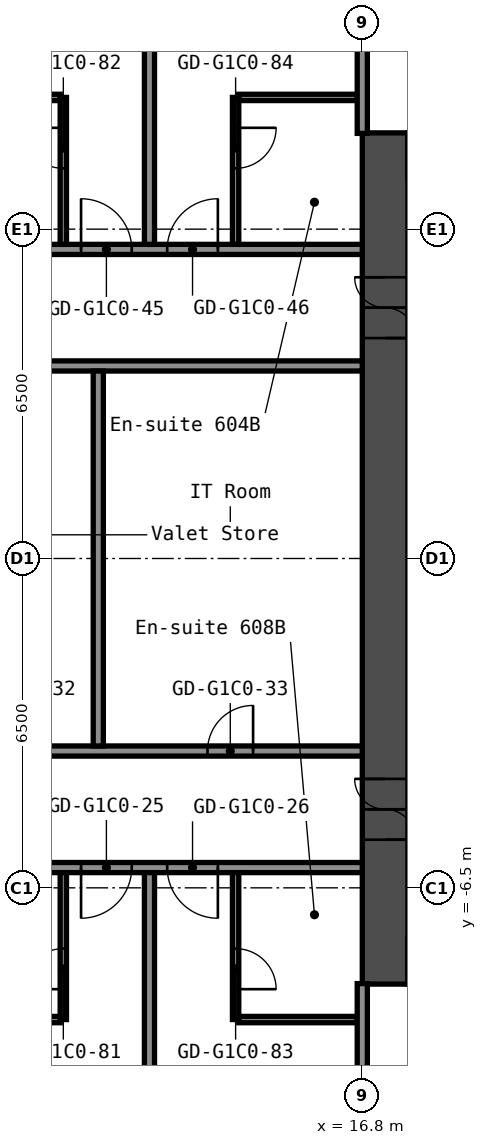
"""IFC4 building model, lengths in metres.
Left out: names, types, materials, properties, quantities, classifications, styles, units other than length and angle.
Written with IfcOpenShell. Run it as: python <this file> out.ifc"""

import sys

from ifc_helpers import new_model, si_unit, direction, frame, frame_2d, origin, place, context, subcontext, project, spatial, rectangle, extrude, element, fill, save


model = new_model("IFC4")
c1 = context("Model", 3, precision=1e-05, world=origin(), true_north=direction((0.0, 1.0)))
c2 = subcontext(c1, "Body", "Model", "MODEL_VIEW")
j1 = project(units=[si_unit("LENGTHUNIT", "METRE"), si_unit("PLANEANGLEUNIT", "RADIAN")], contexts=[c1])
p1 = place(None, origin())
s1 = spatial("IfcSite", under=j1, at=p1, CompositionType="ELEMENT")
p2 = place(p1, origin())
s2 = spatial("IfcBuilding", under=s1, at=p2, CompositionType="ELEMENT")
p3 = place(p2, frame((0.0, 0.0, 26.2)))
s3 = spatial("IfcBuildingStorey", under=s2, at=p3, CompositionType="ELEMENT", Elevation=26.2)
p4 = place(p3, frame((17.25, -8.4, 0.0), z_axis=(0.0, 0.0, 1.0), x_axis=(0.0, 1.0, 0.0)))
e1 = element("IfcWall", 1, at=p4, inside=s3, PredefinedType="SHEAR", context=c2, shape_type="SweptSolid", body=[
    extrude(rectangle(XDim=16.8, YDim=0.9, at=frame_2d((8.4, 0.0))), origin(), (0.0, 0.0, 1.0), 2.8),
])
p5 = place(p4, frame((12.75, 0.0, 0.0)))
e2 = element("IfcOpeningElement", 2, at=p5, cuts=e1, PredefinedType="OPENING", context=c2, shape_type="SweptSolid", body=[
    extrude(rectangle(XDim=1.2, YDim=2.1, at=frame_2d((0.6, 1.05))), frame((0.0, 0.46, 0.0), z_axis=(0.0, -1.0, 0.0), x_axis=(1.0, 0.0, 0.0)), (0.0, 0.0, 1.0), 0.92),
])
p6 = place(p4, frame((2.85, 0.0, 0.0)))
e3 = element("IfcOpeningElement", 3, at=p6, cuts=e1, PredefinedType="OPENING", context=c2, shape_type="SweptSolid", body=[
    extrude(rectangle(XDim=1.2, YDim=2.1, at=frame_2d((0.6, 1.05))), frame((0.0, 0.46, 0.0), z_axis=(0.0, -1.0, 0.0), x_axis=(1.0, 0.0, 0.0)), (0.0, 0.0, 1.0), 0.92),
])
p7 = place(p3, frame((17.7, 7.95, 0.0), z_axis=(0.0, 0.0, 1.0), x_axis=(1.0, 0.0, 0.0)))
e4 = element("IfcWall", 4, at=p7, inside=s3, PredefinedType="SHEAR", context=c2, shape_type="SweptSolid", body=[
    extrude(rectangle(XDim=15.0, YDim=0.9, at=frame_2d((7.5, 0.0))), origin(), (0.0, 0.0, 1.0), 2.8),
])
p8 = place(p7, frame((10.4, 0.0, 0.0)))
e5 = element("IfcOpeningElement", 5, at=p8, cuts=e4, PredefinedType="OPENING", context=c2, shape_type="SweptSolid", body=[
    extrude(rectangle(XDim=1.2, YDim=2.1, at=frame_2d((0.6, 1.05))), frame((0.0, 0.46, 0.0), z_axis=(0.0, -1.0, 0.0), x_axis=(1.0, 0.0, 0.0)), (0.0, 0.0, 1.0), 0.92),
])
p9 = place(p7, frame((13.35, 0.0, 0.0)))
e6 = element("IfcOpeningElement", 6, at=p9, cuts=e4, PredefinedType="OPENING", context=c2, shape_type="SweptSolid", body=[
    extrude(rectangle(XDim=0.9, YDim=2.1, at=frame_2d((0.45, 1.05))), frame((0.0, 0.46, 0.0), z_axis=(0.0, -1.0, 0.0), x_axis=(1.0, 0.0, 0.0)), (0.0, 0.0, 1.0), 0.92),
])
p10 = place(p3, frame((17.7, -7.95, 0.0), z_axis=(0.0, 0.0, 1.0), x_axis=(1.0, 0.0, 0.0)))
e7 = element("IfcWall", 7, at=p10, inside=s3, PredefinedType="SHEAR", context=c2, shape_type="SweptSolid", body=[
    extrude(rectangle(XDim=15.0, YDim=0.9, at=frame_2d((7.5, 0.0))), origin(), (0.0, 0.0, 1.0), 2.8),
])
p11 = place(p10, frame((2.55, 0.0, 0.0)))
e8 = element("IfcOpeningElement", 8, at=p11, cuts=e7, PredefinedType="OPENING", context=c2, shape_type="SweptSolid", body=[
    extrude(rectangle(XDim=1.0, YDim=2.1, at=frame_2d((0.5, 1.05))), frame((0.0, 0.46, 0.0), z_axis=(0.0, -1.0, 0.0), x_axis=(1.0, 0.0, 0.0)), (0.0, 0.0, 1.0), 0.92),
])
for number, where, z_axis, x_axis in (
    (9, (8.5, -9.1, 0.0), (0.0, 0.0, 1.0), (1.0, 0.0, 0.0)),
    (10, (14.363, -9.1, 0.0), (0.0, 0.0, 1.0), (1.0, 0.0, 0.0)),
):
    element("IfcWall", number, at=place(p3, frame(where, z_axis=z_axis, x_axis=x_axis)), inside=s3, PredefinedType="PARTITIONING", context=c2, shape_type="SweptSolid", body=[
        extrude(rectangle(XDim=2.337, YDim=0.125, at=frame_2d((1.169, 0.0))), origin(), (0.0, 0.0, 1.0), 2.8),
    ])
p12 = place(p3, frame((-16.8, -6.1, 0.0), z_axis=(0.0, 0.0, 1.0), x_axis=(1.0, 0.0, 0.0)))
e11 = element("IfcWall", 11, at=p12, inside=s3, PredefinedType="PARTITIONING", context=c2, shape_type="SweptSolid", body=[
    extrude(rectangle(XDim=33.6, YDim=0.2, at=frame_2d((16.8, 0.0))), origin(), (0.0, 0.0, 1.0), 2.8),
])
p13 = place(p12, frame((2.0, 0.0, 0.0)))
e12 = element("IfcOpeningElement", 12, at=p13, cuts=e11, PredefinedType="OPENING", context=c2, shape_type="SweptSolid", body=[
    extrude(rectangle(XDim=1.0, YDim=2.1, at=frame_2d((0.5, 1.05))), frame((0.0, 0.11, 0.0), z_axis=(0.0, -1.0, 0.0), x_axis=(1.0, 0.0, 0.0)), (0.0, 0.0, 1.0), 0.22),
])
p14 = place(p12, frame((11.25, 0.0, 0.0)))
e13 = element("IfcOpeningElement", 13, at=p14, cuts=e11, PredefinedType="OPENING", context=c2, shape_type="SweptSolid", body=[
    extrude(rectangle(XDim=1.0, YDim=2.1, at=frame_2d((0.5, 1.05))), frame((0.0, 0.11, 0.0), z_axis=(0.0, -1.0, 0.0), x_axis=(1.0, 0.0, 0.0)), (0.0, 0.0, 1.0), 0.22),
])
p15 = place(p12, frame((12.95, 0.0, 0.0)))
e14 = element("IfcOpeningElement", 14, at=p15, cuts=e11, PredefinedType="OPENING", context=c2, shape_type="SweptSolid", body=[
    extrude(rectangle(XDim=1.0, YDim=2.1, at=frame_2d((0.5, 1.05))), frame((0.0, 0.11, 0.0), z_axis=(0.0, -1.0, 0.0), x_axis=(1.0, 0.0, 0.0)), (0.0, 0.0, 1.0), 0.22),
])
p16 = place(p12, frame((18.28, 0.0, 0.0)))
e15 = element("IfcOpeningElement", 15, at=p16, cuts=e11, PredefinedType="OPENING", context=c2, shape_type="SweptSolid", body=[
    extrude(rectangle(XDim=0.9, YDim=2.1, at=frame_2d((0.45, 1.05))), frame((0.0, 0.11, 0.0), z_axis=(0.0, -1.0, 0.0), x_axis=(1.0, 0.0, 0.0)), (0.0, 0.0, 1.0), 0.22),
])
p17 = place(p12, frame((22.48, 0.0, 0.0)))
e16 = element("IfcOpeningElement", 16, at=p17, cuts=e11, PredefinedType="OPENING", context=c2, shape_type="SweptSolid", body=[
    extrude(rectangle(XDim=0.9, YDim=2.1, at=frame_2d((0.45, 1.05))), frame((0.0, 0.11, 0.0), z_axis=(0.0, -1.0, 0.0), x_axis=(1.0, 0.0, 0.0)), (0.0, 0.0, 1.0), 0.22),
])
p18 = place(p12, frame((28.05, 0.0, 0.0)))
e17 = element("IfcOpeningElement", 17, at=p18, cuts=e11, PredefinedType="OPENING", context=c2, shape_type="SweptSolid", body=[
    extrude(rectangle(XDim=1.0, YDim=2.1, at=frame_2d((0.5, 1.05))), frame((0.0, 0.11, 0.0), z_axis=(0.0, -1.0, 0.0), x_axis=(1.0, 0.0, 0.0)), (0.0, 0.0, 1.0), 0.22),
])
p19 = place(p12, frame((29.75, 0.0, 0.0)))
e18 = element("IfcOpeningElement", 18, at=p19, cuts=e11, PredefinedType="OPENING", context=c2, shape_type="SweptSolid", body=[
    extrude(rectangle(XDim=1.0, YDim=2.1, at=frame_2d((0.5, 1.05))), frame((0.0, 0.11, 0.0), z_axis=(0.0, -1.0, 0.0), x_axis=(1.0, 0.0, 0.0)), (0.0, 0.0, 1.0), 0.22),
])
p20 = place(p3, frame((-16.8, -3.8, 0.0), z_axis=(0.0, 0.0, 1.0), x_axis=(1.0, 0.0, 0.0)))
e19 = element("IfcWall", 19, at=p20, inside=s3, PredefinedType="PARTITIONING", context=c2, shape_type="SweptSolid", body=[
    extrude(rectangle(XDim=33.6, YDim=0.2, at=frame_2d((16.8, 0.0))), origin(), (0.0, 0.0, 1.0), 2.8),
])
p21 = place(p20, frame((9.715, 0.0, 0.0)))
e20 = element("IfcOpeningElement", 20, at=p21, cuts=e19, PredefinedType="OPENING", context=c2, shape_type="SweptSolid", body=[
    extrude(rectangle(XDim=0.9, YDim=2.1, at=frame_2d((0.45, 1.05))), frame((0.0, 0.11, 0.0), z_axis=(0.0, -1.0, 0.0), x_axis=(1.0, 0.0, 0.0)), (0.0, 0.0, 1.0), 0.22),
])
p22 = place(p20, frame((13.915, 0.0, 0.0)))
e21 = element("IfcOpeningElement", 21, at=p22, cuts=e19, PredefinedType="OPENING", context=c2, shape_type="SweptSolid", body=[
    extrude(rectangle(XDim=0.9, YDim=2.1, at=frame_2d((0.45, 1.05))), frame((0.0, 0.11, 0.0), z_axis=(0.0, -1.0, 0.0), x_axis=(1.0, 0.0, 0.0)), (0.0, 0.0, 1.0), 0.22),
])
p23 = place(p20, frame((26.345, 0.0, 0.0)))
e22 = element("IfcOpeningElement", 22, at=p23, cuts=e19, PredefinedType="OPENING", context=c2, shape_type="SweptSolid", body=[
    extrude(rectangle(XDim=0.9, YDim=2.1, at=frame_2d((0.45, 1.05))), frame((0.0, 0.11, 0.0), z_axis=(0.0, -1.0, 0.0), x_axis=(1.0, 0.0, 0.0)), (0.0, 0.0, 1.0), 0.22),
])
p24 = place(p20, frame((30.545, 0.0, 0.0)))
e23 = element("IfcOpeningElement", 23, at=p24, cuts=e19, PredefinedType="OPENING", context=c2, shape_type="SweptSolid", body=[
    extrude(rectangle(XDim=0.9, YDim=2.1, at=frame_2d((0.45, 1.05))), frame((0.0, 0.11, 0.0), z_axis=(0.0, -1.0, 0.0), x_axis=(1.0, 0.0, 0.0)), (0.0, 0.0, 1.0), 0.22),
])
p25 = place(p3, frame((-16.8, 3.8, 0.0), z_axis=(0.0, 0.0, 1.0), x_axis=(1.0, 0.0, 0.0)))
e24 = element("IfcWall", 24, at=p25, inside=s3, PredefinedType="PARTITIONING", context=c2, shape_type="SweptSolid", body=[
    extrude(rectangle(XDim=33.6, YDim=0.2, at=frame_2d((16.8, 0.0))), origin(), (0.0, 0.0, 1.0), 2.8),
])
p26 = place(p25, frame((1.985, 0.0, 0.0)))
e25 = element("IfcOpeningElement", 25, at=p26, cuts=e24, PredefinedType="OPENING", context=c2, shape_type="SweptSolid", body=[
    extrude(rectangle(XDim=0.9, YDim=2.1, at=frame_2d((0.45, 1.05))), frame((0.0, 0.11, 0.0), z_axis=(0.0, -1.0, 0.0), x_axis=(1.0, 0.0, 0.0)), (0.0, 0.0, 1.0), 0.22),
])
p27 = place(p25, frame((6.185, 0.0, 0.0)))
e26 = element("IfcOpeningElement", 26, at=p27, cuts=e24, PredefinedType="OPENING", context=c2, shape_type="SweptSolid", body=[
    extrude(rectangle(XDim=0.9, YDim=2.1, at=frame_2d((0.45, 1.05))), frame((0.0, 0.11, 0.0), z_axis=(0.0, -1.0, 0.0), x_axis=(1.0, 0.0, 0.0)), (0.0, 0.0, 1.0), 0.22),
])
p28 = place(p25, frame((18.2, 0.0, 0.0)))
e27 = element("IfcOpeningElement", 27, at=p28, cuts=e24, PredefinedType="OPENING", context=c2, shape_type="SweptSolid", body=[
    extrude(rectangle(XDim=0.9, YDim=2.1, at=frame_2d((0.45, 1.05))), frame((0.0, 0.11, 0.0), z_axis=(0.0, -1.0, 0.0), x_axis=(1.0, 0.0, 0.0)), (0.0, 0.0, 1.0), 0.22),
])
p29 = place(p25, frame((22.4, 0.0, 0.0)))
e28 = element("IfcOpeningElement", 28, at=p29, cuts=e24, PredefinedType="OPENING", context=c2, shape_type="SweptSolid", body=[
    extrude(rectangle(XDim=0.9, YDim=2.1, at=frame_2d((0.45, 1.05))), frame((0.0, 0.11, 0.0), z_axis=(0.0, -1.0, 0.0), x_axis=(1.0, 0.0, 0.0)), (0.0, 0.0, 1.0), 0.22),
])
p30 = place(p3, frame((-16.8, 6.1, 0.0), z_axis=(0.0, 0.0, 1.0), x_axis=(1.0, 0.0, 0.0)))
e29 = element("IfcWall", 29, at=p30, inside=s3, PredefinedType="PARTITIONING", context=c2, shape_type="SweptSolid", body=[
    extrude(rectangle(XDim=33.6, YDim=0.2, at=frame_2d((16.8, 0.0))), origin(), (0.0, 0.0, 1.0), 2.8),
])
p31 = place(p30, frame((2.0, 0.0, 0.0)))
e30 = element("IfcOpeningElement", 30, at=p31, cuts=e29, PredefinedType="OPENING", context=c2, shape_type="SweptSolid", body=[
    extrude(rectangle(XDim=1.0, YDim=2.1, at=frame_2d((0.5, 1.05))), frame((0.0, 0.11, 0.0), z_axis=(0.0, -1.0, 0.0), x_axis=(1.0, 0.0, 0.0)), (0.0, 0.0, 1.0), 0.22),
])
p32 = place(p30, frame((11.25, 0.0, 0.0)))
e31 = element("IfcOpeningElement", 31, at=p32, cuts=e29, PredefinedType="OPENING", context=c2, shape_type="SweptSolid", body=[
    extrude(rectangle(XDim=1.0, YDim=2.1, at=frame_2d((0.5, 1.05))), frame((0.0, 0.11, 0.0), z_axis=(0.0, -1.0, 0.0), x_axis=(1.0, 0.0, 0.0)), (0.0, 0.0, 1.0), 0.22),
])
p33 = place(p30, frame((12.95, 0.0, 0.0)))
e32 = element("IfcOpeningElement", 32, at=p33, cuts=e29, PredefinedType="OPENING", context=c2, shape_type="SweptSolid", body=[
    extrude(rectangle(XDim=1.0, YDim=2.1, at=frame_2d((0.5, 1.05))), frame((0.0, 0.11, 0.0), z_axis=(0.0, -1.0, 0.0), x_axis=(1.0, 0.0, 0.0)), (0.0, 0.0, 1.0), 0.22),
])
p34 = place(p30, frame((18.7, 0.0, 0.0)))
e33 = element("IfcOpeningElement", 33, at=p34, cuts=e29, PredefinedType="OPENING", context=c2, shape_type="SweptSolid", body=[
    extrude(rectangle(XDim=0.9, YDim=2.1, at=frame_2d((0.45, 1.05))), frame((0.0, 0.11, 0.0), z_axis=(0.0, -1.0, 0.0), x_axis=(1.0, 0.0, 0.0)), (0.0, 0.0, 1.0), 0.22),
])
p35 = place(p30, frame((22.9, 0.0, 0.0)))
e34 = element("IfcOpeningElement", 34, at=p35, cuts=e29, PredefinedType="OPENING", context=c2, shape_type="SweptSolid", body=[
    extrude(rectangle(XDim=0.9, YDim=2.1, at=frame_2d((0.45, 1.05))), frame((0.0, 0.11, 0.0), z_axis=(0.0, -1.0, 0.0), x_axis=(1.0, 0.0, 0.0)), (0.0, 0.0, 1.0), 0.22),
])
p36 = place(p30, frame((28.05, 0.0, 0.0)))
e35 = element("IfcOpeningElement", 35, at=p36, cuts=e29, PredefinedType="OPENING", context=c2, shape_type="SweptSolid", body=[
    extrude(rectangle(XDim=1.0, YDim=2.1, at=frame_2d((0.5, 1.05))), frame((0.0, 0.11, 0.0), z_axis=(0.0, -1.0, 0.0), x_axis=(1.0, 0.0, 0.0)), (0.0, 0.0, 1.0), 0.22),
])
p37 = place(p30, frame((29.75, 0.0, 0.0)))
e36 = element("IfcOpeningElement", 36, at=p37, cuts=e29, PredefinedType="OPENING", context=c2, shape_type="SweptSolid", body=[
    extrude(rectangle(XDim=1.0, YDim=2.1, at=frame_2d((0.5, 1.05))), frame((0.0, 0.11, 0.0), z_axis=(0.0, -1.0, 0.0), x_axis=(1.0, 0.0, 0.0)), (0.0, 0.0, 1.0), 0.22),
])
for number, where, z_axis, x_axis in (
    (37, (8.5, 9.1, 0.0), (0.0, 0.0, 1.0), (1.0, 0.0, 0.0)),
    (38, (14.363, 9.1, 0.0), (0.0, 0.0, 1.0), (1.0, 0.0, 0.0)),
):
    element("IfcWall", number, at=place(p3, frame(where, z_axis=z_axis, x_axis=x_axis)), inside=s3, PredefinedType="PARTITIONING", context=c2, shape_type="SweptSolid", body=[
        extrude(rectangle(XDim=2.337, YDim=0.125, at=frame_2d((1.169, 0.0))), origin(), (0.0, 0.0, 1.0), 2.8),
    ])
p38 = place(p3, frame((10.9, -9.1, 0.0), z_axis=(0.0, 0.0, 1.0), x_axis=(0.0, 1.0, 0.0)))
e39 = element("IfcWall", 39, at=p38, inside=s3, PredefinedType="PARTITIONING", context=c2, shape_type="SweptSolid", body=[
    extrude(rectangle(XDim=2.9, YDim=0.125, at=frame_2d((1.45, 0.0))), origin(), (0.0, 0.0, 1.0), 2.8),
])
p39 = place(p38, frame((0.6, 0.0, 0.0)))
e40 = element("IfcOpeningElement", 40, at=p39, cuts=e39, PredefinedType="OPENING", context=c2, shape_type="SweptSolid", body=[
    extrude(rectangle(XDim=0.8, YDim=2.1, at=frame_2d((0.4, 1.05))), frame((0.0, 0.073, 0.0), z_axis=(0.0, -1.0, 0.0), x_axis=(1.0, 0.0, 0.0)), (0.0, 0.0, 1.0), 0.145),
])
p40 = place(p3, frame((10.9, 6.2, 0.0), z_axis=(0.0, 0.0, 1.0), x_axis=(0.0, 1.0, 0.0)))
e41 = element("IfcWall", 41, at=p40, inside=s3, PredefinedType="PARTITIONING", context=c2, shape_type="SweptSolid", body=[
    extrude(rectangle(XDim=2.9, YDim=0.125, at=frame_2d((1.45, 0.0))), origin(), (0.0, 0.0, 1.0), 2.8),
])
p41 = place(p40, frame((1.5, 0.0, 0.0)))
e42 = element("IfcOpeningElement", 42, at=p41, cuts=e41, PredefinedType="OPENING", context=c2, shape_type="SweptSolid", body=[
    extrude(rectangle(XDim=0.8, YDim=2.1, at=frame_2d((0.4, 1.05))), frame((0.0, 0.073, 0.0), z_axis=(0.0, -1.0, 0.0), x_axis=(1.0, 0.0, 0.0)), (0.0, 0.0, 1.0), 0.145),
])
p42 = place(p3, frame((11.59, -3.7, 0.0), z_axis=(0.0, 0.0, 1.0), x_axis=(0.0, 1.0, 0.0)))
e43 = element("IfcWall", 43, at=p42, inside=s3, PredefinedType="PARTITIONING", context=c2, shape_type="SweptSolid", body=[
    extrude(rectangle(XDim=7.4, YDim=0.2, at=frame_2d((3.7, 0.0))), origin(), (0.0, 0.0, 1.0), 2.8),
])
for number, where, z_axis, x_axis in (
    (44, (12.6, -20.3, 0.0), (0.0, 0.0, 1.0), (0.0, 1.0, 0.0)),
    (45, (12.6, 6.2, 0.0), (0.0, 0.0, 1.0), (0.0, 1.0, 0.0)),
):
    element("IfcWall", number, at=place(p3, frame(where, z_axis=z_axis, x_axis=x_axis)), inside=s3, PredefinedType="PARTITIONING", context=c2, shape_type="SweptSolid", body=[
        extrude(rectangle(XDim=14.1, YDim=0.2, at=frame_2d((7.05, 0.0))), origin(), (0.0, 0.0, 1.0), 2.8),
    ])
p43 = place(p3, frame((14.3, -9.1, 0.0), z_axis=(0.0, 0.0, 1.0), x_axis=(0.0, 1.0, 0.0)))
e46 = element("IfcWall", 46, at=p43, inside=s3, PredefinedType="PARTITIONING", context=c2, shape_type="SweptSolid", body=[
    extrude(rectangle(XDim=2.9, YDim=0.125, at=frame_2d((1.45, 0.0))), origin(), (0.0, 0.0, 1.0), 2.8),
])
p44 = place(p43, frame((0.6, 0.0, 0.0)))
e47 = element("IfcOpeningElement", 47, at=p44, cuts=e46, PredefinedType="OPENING", context=c2, shape_type="SweptSolid", body=[
    extrude(rectangle(XDim=0.8, YDim=2.1, at=frame_2d((0.4, 1.05))), frame((0.0, 0.073, 0.0), z_axis=(0.0, -1.0, 0.0), x_axis=(1.0, 0.0, 0.0)), (0.0, 0.0, 1.0), 0.145),
])
p45 = place(p3, frame((14.3, 6.2, 0.0), z_axis=(0.0, 0.0, 1.0), x_axis=(0.0, 1.0, 0.0)))
e48 = element("IfcWall", 48, at=p45, inside=s3, PredefinedType="PARTITIONING", context=c2, shape_type="SweptSolid", body=[
    extrude(rectangle(XDim=2.9, YDim=0.125, at=frame_2d((1.45, 0.0))), origin(), (0.0, 0.0, 1.0), 2.8),
])
p46 = place(p45, frame((1.5, 0.0, 0.0)))
e49 = element("IfcOpeningElement", 49, at=p46, cuts=e48, PredefinedType="OPENING", context=c2, shape_type="SweptSolid", body=[
    extrude(rectangle(XDim=0.8, YDim=2.1, at=frame_2d((0.4, 1.05))), frame((0.0, 0.073, 0.0), z_axis=(0.0, -1.0, 0.0), x_axis=(1.0, 0.0, 0.0)), (0.0, 0.0, 1.0), 0.145),
])
for number, where, z_axis, x_axis in (
    (50, (16.8, -20.3, 0.0), (0.0, 0.0, 1.0), (0.0, 1.0, 0.0)),
    (51, (16.8, 8.39, 0.0), (0.0, 0.0, 1.0), (0.0, 1.0, 0.0)),
):
    element("IfcWall", number, at=place(p3, frame(where, z_axis=z_axis, x_axis=x_axis)), inside=s3, PredefinedType="PARTITIONING", context=c2, shape_type="SweptSolid", body=[
        extrude(rectangle(XDim=11.91, YDim=0.2, at=frame_2d((5.955, 0.0))), origin(), (0.0, 0.0, 1.0), 2.8),
    ])
p47 = place(p5, origin())
e52 = element("IfcDoor", 52, at=p47, inside=s3, OperationType="DOUBLE_DOOR_SINGLE_SWING", PredefinedType="DOOR", context=c2, shape_type="SweptSolid", body=[
    extrude(rectangle(XDim=1.2, YDim=2.1, at=frame_2d((0.6, 1.05))), frame((0.0, 0.025, 0.0), z_axis=(0.0, -1.0, 0.0), x_axis=(1.0, 0.0, 0.0)), (0.0, 0.0, 1.0), 0.05),
])
fill(e2, e52)
p48 = place(p6, origin())
e53 = element("IfcDoor", 53, at=p48, inside=s3, OperationType="DOUBLE_DOOR_SINGLE_SWING", PredefinedType="DOOR", context=c2, shape_type="SweptSolid", body=[
    extrude(rectangle(XDim=1.2, YDim=2.1, at=frame_2d((0.6, 1.05))), frame((0.0, 0.025, 0.0), z_axis=(0.0, -1.0, 0.0), x_axis=(1.0, 0.0, 0.0)), (0.0, 0.0, 1.0), 0.05),
])
fill(e3, e53)
p49 = place(p18, origin())
e54 = element("IfcDoor", 54, at=p49, inside=s3, OperationType="SINGLE_SWING_LEFT", PredefinedType="DOOR", context=c2, shape_type="SweptSolid", body=[
    extrude(rectangle(XDim=1.0, YDim=2.1, at=frame_2d((0.5, 1.05))), frame((0.0, 0.025, 0.0), z_axis=(0.0, -1.0, 0.0), x_axis=(1.0, 0.0, 0.0)), (0.0, 0.0, 1.0), 0.05),
])
fill(e17, e54)
p50 = place(p19, origin())
e55 = element("IfcDoor", 55, at=p50, inside=s3, OperationType="SINGLE_SWING_RIGHT", PredefinedType="DOOR", context=c2, shape_type="SweptSolid", body=[
    extrude(rectangle(XDim=1.0, YDim=2.1, at=frame_2d((0.5, 1.05))), frame((0.0, 0.025, 0.0), z_axis=(0.0, -1.0, 0.0), x_axis=(1.0, 0.0, 0.0)), (0.0, 0.0, 1.0), 0.05),
])
fill(e18, e55)
p51 = place(p24, origin())
e56 = element("IfcDoor", 56, at=p51, inside=s3, OperationType="SINGLE_SWING_LEFT", PredefinedType="DOOR", context=c2, shape_type="SweptSolid", body=[
    extrude(rectangle(XDim=0.9, YDim=2.1, at=frame_2d((0.45, 1.05))), frame((0.0, 0.025, 0.0), z_axis=(0.0, -1.0, 0.0), x_axis=(1.0, 0.0, 0.0)), (0.0, 0.0, 1.0), 0.05),
])
fill(e23, e56)
p52 = place(p36, origin())
e57 = element("IfcDoor", 57, at=p52, inside=s3, OperationType="SINGLE_SWING_RIGHT", PredefinedType="DOOR", context=c2, shape_type="SweptSolid", body=[
    extrude(rectangle(XDim=1.0, YDim=2.1, at=frame_2d((0.5, 1.05))), frame((0.0, 0.025, 0.0), z_axis=(0.0, -1.0, 0.0), x_axis=(1.0, 0.0, 0.0)), (0.0, 0.0, 1.0), 0.05),
])
fill(e35, e57)
p53 = place(p37, origin())
e58 = element("IfcDoor", 58, at=p53, inside=s3, OperationType="SINGLE_SWING_LEFT", PredefinedType="DOOR", context=c2, shape_type="SweptSolid", body=[
    extrude(rectangle(XDim=1.0, YDim=2.1, at=frame_2d((0.5, 1.05))), frame((0.0, 0.025, 0.0), z_axis=(0.0, -1.0, 0.0), x_axis=(1.0, 0.0, 0.0)), (0.0, 0.0, 1.0), 0.05),
])
fill(e36, e58)
p54 = place(p39, origin())
e59 = element("IfcDoor", 59, at=p54, inside=s3, OperationType="SINGLE_SWING_RIGHT", PredefinedType="DOOR", context=c2, shape_type="SweptSolid", body=[
    extrude(rectangle(XDim=0.8, YDim=2.1, at=frame_2d((0.4, 1.05))), frame((0.0, 0.025, 0.0), z_axis=(0.0, -1.0, 0.0), x_axis=(1.0, 0.0, 0.0)), (0.0, 0.0, 1.0), 0.05),
])
fill(e40, e59)
p55 = place(p41, origin())
e60 = element("IfcDoor", 60, at=p55, inside=s3, OperationType="SINGLE_SWING_LEFT", PredefinedType="DOOR", context=c2, shape_type="SweptSolid", body=[
    extrude(rectangle(XDim=0.8, YDim=2.1, at=frame_2d((0.4, 1.05))), frame((0.0, 0.025, 0.0), z_axis=(0.0, -1.0, 0.0), x_axis=(1.0, 0.0, 0.0)), (0.0, 0.0, 1.0), 0.05),
])
fill(e42, e60)
p56 = place(p44, origin())
e61 = element("IfcDoor", 61, at=p56, inside=s3, OperationType="SINGLE_SWING_LEFT", PredefinedType="DOOR", context=c2, shape_type="SweptSolid", body=[
    extrude(rectangle(XDim=0.8, YDim=2.1, at=frame_2d((0.4, 1.05))), frame((0.0, 0.025, 0.0), z_axis=(0.0, -1.0, 0.0), x_axis=(1.0, 0.0, 0.0)), (0.0, 0.0, 1.0), 0.05),
])
fill(e47, e61)
p57 = place(p46, origin())
e62 = element("IfcDoor", 62, at=p57, inside=s3, OperationType="SINGLE_SWING_RIGHT", PredefinedType="DOOR", context=c2, shape_type="SweptSolid", body=[
    extrude(rectangle(XDim=0.8, YDim=2.1, at=frame_2d((0.4, 1.05))), frame((0.0, 0.025, 0.0), z_axis=(0.0, -1.0, 0.0), x_axis=(1.0, 0.0, 0.0)), (0.0, 0.0, 1.0), 0.05),
])
fill(e49, e62)
save(model, sys.argv[1])
